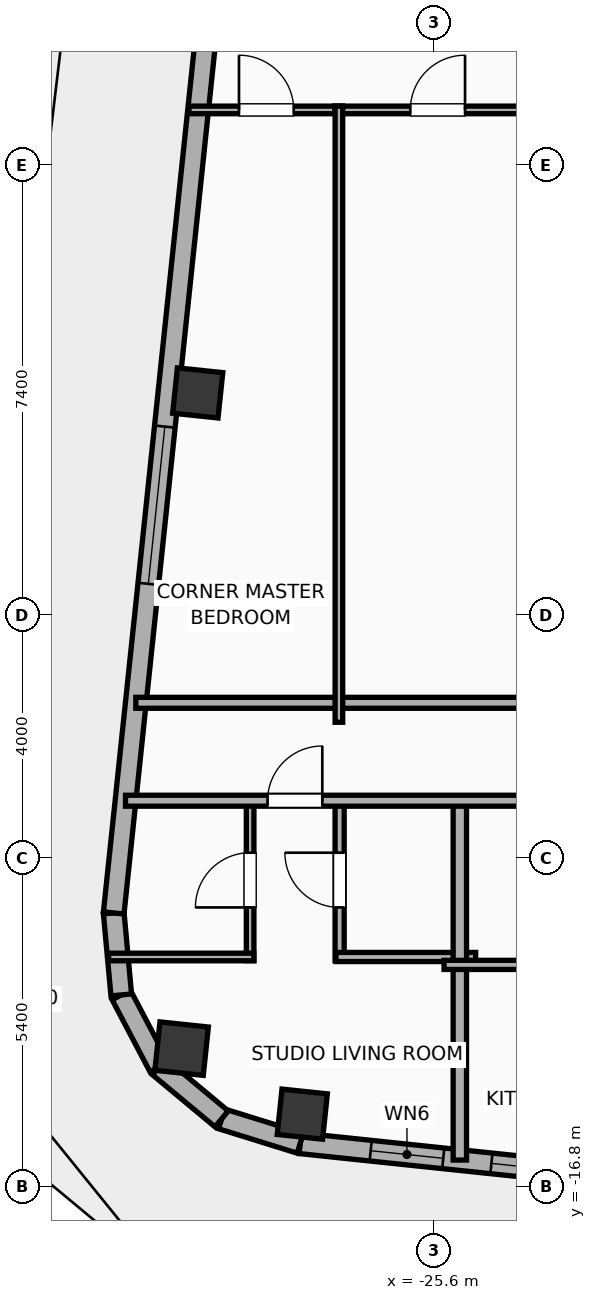
"""IFC4 building model, lengths in metres.
Left out: names, types, materials, properties, quantities, classifications, styles, units other than length and angle.
Written with IfcOpenShell. Run it as: python <this file> out.ifc"""

import sys

from ifc_helpers import new_model, si_unit, direction, frame, frame_2d, origin, origin_2d, place, context, subcontext, project, spatial, rectangle, hollow_rectangle, hollow_circle, extrude, element, fill, save


model = new_model("IFC4")
c1 = context("Model", 3, precision=1e-05, world=origin(), true_north=direction((0.0, 1.0)))
c2 = subcontext(c1, "Body", "Model", "MODEL_VIEW")
j1 = project(units=[si_unit("LENGTHUNIT", "METRE"), si_unit("PLANEANGLEUNIT", "RADIAN")], contexts=[c1])
p1 = place(None, origin())
s1 = spatial("IfcSite", under=j1, at=p1, CompositionType="ELEMENT")
p2 = place(p1, origin())
s2 = spatial("IfcBuilding", under=s1, at=p2, CompositionType="ELEMENT")
p3 = place(p2, frame((0.0, 0.0, 291.2)))
s3 = spatial("IfcBuildingStorey", under=s2, at=p3, CompositionType="ELEMENT", Elevation=291.2)
for number, where, z_axis, x_axis in (
    (1, (-27.769, -15.604, 0.0), (0.0, 0.0, 1.0), (0.995, -0.105, 0.0)),
    (2, (-29.489, -3.744, 0.0), (0.0, 0.0, 1.0), (0.995, -0.105, 0.0)),
):
    element("IfcColumn", number, at=place(p3, frame(where, z_axis=z_axis, x_axis=x_axis)), inside=s3, PredefinedType="COLUMN", context=c2, shape_type="SweptSolid", body=[
        extrude(hollow_rectangle(XDim=0.75, YDim=0.75, WallThickness=0.025, at=origin_2d()), origin(), (0.0, 0.0, 1.0), 3.9),
    ])
p4 = place(p3, frame((-29.753, -14.527, 0.0), z_axis=(0.0, 0.0, 1.0), x_axis=(0.994521895368, -0.104528463268, 0.0)))
e3 = element("IfcColumn", 3, at=p4, inside=s3, PredefinedType="COLUMN", context=c2, shape_type="SweptSolid", body=[
    extrude(hollow_circle(Radius=0.4, WallThickness=0.028, at=origin_2d()), origin(), (0.0, 0.0, 1.0), 3.9),
])
p5 = place(p3, frame((18.708, -20.972, 0.0), z_axis=(0.0, 0.0, 1.0), x_axis=(-0.994521888554, 0.104528528102, 0.0)))
e4 = element("IfcWall", 4, at=p5, inside=s3, PredefinedType="ELEMENTEDWALL", context=c2, shape_type="SweptSolid", body=[
    extrude(rectangle(XDim=46.766, YDim=0.34, at=frame_2d((23.383, 0.0))), origin(), (0.0, 0.0, 1.0), 3.635),
])
p6 = place(p5, frame((23.733, 0.0, 0.65)))
e5 = element("IfcOpeningElement", 5, at=p6, cuts=e4, PredefinedType="OPENING", context=c2, shape_type="SweptSolid", body=[
    extrude(rectangle(XDim=2.6, YDim=2.45, at=frame_2d((1.3, 1.225))), frame((0.0, 0.18, 0.0), z_axis=(0.0, -1.0, 0.0), x_axis=(1.0, 0.0, 0.0)), (0.0, 0.0, 1.0), 0.36),
])
p7 = place(p5, frame((44.402, 0.0, 0.75)))
e6 = element("IfcOpeningElement", 6, at=p7, cuts=e4, PredefinedType="OPENING", context=c2, shape_type="SweptSolid", body=[
    extrude(rectangle(XDim=1.2, YDim=2.05, at=frame_2d((0.6, 1.025))), frame((0.0, 0.18, 0.0), z_axis=(0.0, -1.0, 0.0), x_axis=(1.0, 0.0, 0.0)), (0.0, 0.0, 1.0), 0.36),
])
p8 = place(p5, frame((39.54, 0.0, 0.75)))
e7 = element("IfcOpeningElement", 7, at=p8, cuts=e4, PredefinedType="OPENING", context=c2, shape_type="SweptSolid", body=[
    extrude(rectangle(XDim=1.2, YDim=2.05, at=frame_2d((0.6, 1.025))), frame((0.0, 0.18, 0.0), z_axis=(0.0, -1.0, 0.0), x_axis=(1.0, 0.0, 0.0)), (0.0, 0.0, 1.0), 0.36),
])
p9 = place(p5, frame((42.406, 0.0, 0.75)))
e8 = element("IfcOpeningElement", 8, at=p9, cuts=e4, PredefinedType="OPENING", context=c2, shape_type="SweptSolid", body=[
    extrude(rectangle(XDim=1.2, YDim=2.05, at=frame_2d((0.6, 1.025))), frame((0.0, 0.18, 0.0), z_axis=(0.0, -1.0, 0.0), x_axis=(1.0, 0.0, 0.0)), (0.0, 0.0, 1.0), 0.36),
])
p10 = place(p5, frame((34.933, 0.0, 0.75)))
e9 = element("IfcOpeningElement", 9, at=p10, cuts=e4, PredefinedType="OPENING", context=c2, shape_type="SweptSolid", body=[
    extrude(rectangle(XDim=1.2, YDim=2.05, at=frame_2d((0.6, 1.025))), frame((0.0, 0.18, 0.0), z_axis=(0.0, -1.0, 0.0), x_axis=(1.0, 0.0, 0.0)), (0.0, 0.0, 1.0), 0.36),
])
p11 = place(p5, frame((28.631, 0.0, 0.75)))
e10 = element("IfcOpeningElement", 10, at=p11, cuts=e4, PredefinedType="OPENING", context=c2, shape_type="SweptSolid", body=[
    extrude(rectangle(XDim=1.2, YDim=2.05, at=frame_2d((0.6, 1.025))), frame((0.0, 0.18, 0.0), z_axis=(0.0, -1.0, 0.0), x_axis=(1.0, 0.0, 0.0)), (0.0, 0.0, 1.0), 0.36),
])
p12 = place(p5, frame((30.896, 0.0, 0.75)))
e11 = element("IfcOpeningElement", 11, at=p12, cuts=e4, PredefinedType="OPENING", context=c2, shape_type="SweptSolid", body=[
    extrude(rectangle(XDim=1.2, YDim=2.05, at=frame_2d((0.6, 1.025))), frame((0.0, 0.18, 0.0), z_axis=(0.0, -1.0, 0.0), x_axis=(1.0, 0.0, 0.0)), (0.0, 0.0, 1.0), 0.36),
])
p13 = place(p5, frame((7.501, 0.0, 0.75)))
e12 = element("IfcOpeningElement", 12, at=p13, cuts=e4, PredefinedType="OPENING", context=c2, shape_type="SweptSolid", body=[
    extrude(rectangle(XDim=1.2, YDim=2.05, at=frame_2d((0.6, 1.025))), frame((0.0, 0.18, 0.0), z_axis=(0.0, -1.0, 0.0), x_axis=(1.0, 0.0, 0.0)), (0.0, 0.0, 1.0), 0.36),
])
p14 = place(p5, frame((4.159, 0.0, 0.75)))
e13 = element("IfcOpeningElement", 13, at=p14, cuts=e4, PredefinedType="OPENING", context=c2, shape_type="SweptSolid", body=[
    extrude(rectangle(XDim=1.2, YDim=2.05, at=frame_2d((0.6, 1.025))), frame((0.0, 0.18, 0.0), z_axis=(0.0, -1.0, 0.0), x_axis=(1.0, 0.0, 0.0)), (0.0, 0.0, 1.0), 0.36),
])
p15 = place(p5, frame((1.369, 0.0, 0.75)))
e14 = element("IfcOpeningElement", 14, at=p15, cuts=e4, PredefinedType="OPENING", context=c2, shape_type="SweptSolid", body=[
    extrude(rectangle(XDim=1.2, YDim=2.05, at=frame_2d((0.6, 1.025))), frame((0.0, 0.18, 0.0), z_axis=(0.0, -1.0, 0.0), x_axis=(1.0, 0.0, 0.0)), (0.0, 0.0, 1.0), 0.36),
])
p16 = place(p5, frame((20.254, 0.0, 0.75)))
e15 = element("IfcOpeningElement", 15, at=p16, cuts=e4, PredefinedType="OPENING", context=c2, shape_type="SweptSolid", body=[
    extrude(rectangle(XDim=1.2, YDim=2.05, at=frame_2d((0.6, 1.025))), frame((0.0, 0.18, 0.0), z_axis=(0.0, -1.0, 0.0), x_axis=(1.0, 0.0, 0.0)), (0.0, 0.0, 1.0), 0.36),
])
p17 = place(p5, frame((16.172, 0.0, 0.75)))
e16 = element("IfcOpeningElement", 16, at=p17, cuts=e4, PredefinedType="OPENING", context=c2, shape_type="SweptSolid", body=[
    extrude(rectangle(XDim=1.2, YDim=2.05, at=frame_2d((0.6, 1.025))), frame((0.0, 0.18, 0.0), z_axis=(0.0, -1.0, 0.0), x_axis=(1.0, 0.0, 0.0)), (0.0, 0.0, 1.0), 0.36),
])
p18 = place(p5, frame((12.11, 0.0, 0.75)))
e17 = element("IfcOpeningElement", 17, at=p18, cuts=e4, PredefinedType="OPENING", context=c2, shape_type="SweptSolid", body=[
    extrude(rectangle(XDim=1.2, YDim=2.05, at=frame_2d((0.6, 1.025))), frame((0.0, 0.18, 0.0), z_axis=(0.0, -1.0, 0.0), x_axis=(1.0, 0.0, 0.0)), (0.0, 0.0, 1.0), 0.36),
])
p19 = place(p3, frame((-27.802, -16.084, 0.0), z_axis=(0.0, 0.0, 1.0), x_axis=(-0.955007802701, 0.296580674994, 0.0)))
e18 = element("IfcWall", 18, at=p19, inside=s3, PredefinedType="ELEMENTEDWALL", context=c2, shape_type="SweptSolid", body=[
    extrude(rectangle(XDim=1.354, YDim=0.34, at=frame_2d((0.677, 0.0))), origin(), (0.0, 0.0, 1.0), 3.635),
])
p20 = place(p3, frame((-29.096, -15.682, 0.0), z_axis=(0.0, 0.0, 1.0), x_axis=(-0.768864427906, 0.639411832469, 0.0)))
e19 = element("IfcWall", 19, at=p20, inside=s3, PredefinedType="ELEMENTEDWALL", context=c2, shape_type="SweptSolid", body=[
    extrude(rectangle(XDim=1.337, YDim=0.34, at=frame_2d((0.668, 0.0))), origin(), (0.0, 0.0, 1.0), 3.635),
])
p21 = place(p3, frame((-30.124, -14.827, 0.0), z_axis=(0.0, 0.0, 1.0), x_axis=(-0.465528132217, 0.885033083062, 0.0)))
e20 = element("IfcWall", 20, at=p21, inside=s3, PredefinedType="ELEMENTEDWALL", context=c2, shape_type="SweptSolid", body=[
    extrude(rectangle(XDim=1.337, YDim=0.34, at=frame_2d((0.668, 0.0))), origin(), (0.0, 0.0, 1.0), 3.635),
])
p22 = place(p3, frame((-30.746, -13.644, 0.0), z_axis=(0.0, 0.0, 1.0), x_axis=(-0.091592370975, 0.995796584438, 0.0)))
e21 = element("IfcWall", 21, at=p22, inside=s3, PredefinedType="ELEMENTEDWALL", context=c2, shape_type="SweptSolid", body=[
    extrude(rectangle(XDim=1.354, YDim=0.34, at=frame_2d((0.677, 0.0))), origin(), (0.0, 0.0, 1.0), 3.635),
])
p23 = place(p3, frame((-30.87, -12.296, 0.0), z_axis=(0.0, 0.0, 1.0), x_axis=(0.104533282919, 0.994521388791, 0.0)))
e22 = element("IfcWall", 22, at=p23, inside=s3, PredefinedType="ELEMENTEDWALL", context=c2, shape_type="SweptSolid", body=[
    extrude(rectangle(XDim=30.366, YDim=0.34, at=frame_2d((15.183, 0.0))), origin(), (0.0, 0.0, 1.0), 3.635),
])
p24 = place(p23, frame((14.433, 0.0, 0.0)))
e23 = element("IfcOpeningElement", 23, at=p24, cuts=e22, PredefinedType="OPENING", context=c2, shape_type="SweptSolid", body=[
    extrude(rectangle(XDim=1.5, YDim=2.05, at=frame_2d((0.75, 1.025))), frame((0.0, 0.18, 0.0), z_axis=(0.0, -1.0, 0.0), x_axis=(1.0, 0.0, 0.0)), (0.0, 0.0, 1.0), 0.36),
])
p25 = place(p23, frame((5.442, 0.0, 0.65)))
e24 = element("IfcOpeningElement", 24, at=p25, cuts=e22, PredefinedType="OPENING", context=c2, shape_type="SweptSolid", body=[
    extrude(rectangle(XDim=2.6, YDim=2.45, at=frame_2d((1.3, 1.225))), frame((0.0, 0.18, 0.0), z_axis=(0.0, -1.0, 0.0), x_axis=(1.0, 0.0, 0.0)), (0.0, 0.0, 1.0), 0.36),
])
p26 = place(p23, frame((26.861, 0.0, 0.75)))
e25 = element("IfcOpeningElement", 25, at=p26, cuts=e22, PredefinedType="OPENING", context=c2, shape_type="SweptSolid", body=[
    extrude(rectangle(XDim=1.2, YDim=2.05, at=frame_2d((0.6, 1.025))), frame((0.0, 0.18, 0.0), z_axis=(0.0, -1.0, 0.0), x_axis=(1.0, 0.0, 0.0)), (0.0, 0.0, 1.0), 0.36),
])
p27 = place(p3, frame((-30.507, -8.84, 0.0), z_axis=(0.0, 0.0, 1.0), x_axis=(1.0, 0.0, 0.0)))
e26 = element("IfcWall", 26, at=p27, inside=s3, PredefinedType="PARTITIONING", context=c2, shape_type="SweptSolid", body=[
    extrude(rectangle(XDim=20.627, YDim=0.18, at=frame_2d((10.313, 0.0))), origin(), (0.0, 0.0, 1.0), 3.635),
])
p28 = place(p3, frame((-28.627, -13.08, 0.0), z_axis=(0.0, 0.0, 1.0), x_axis=(0.0, 1.0, 0.0)))
e27 = element("IfcWall", 27, at=p28, inside=s3, PredefinedType="PARTITIONING", context=c2, shape_type="SweptSolid", body=[
    extrude(rectangle(XDim=2.65, YDim=0.125, at=frame_2d((1.325, 0.0))), origin(), (0.0, 0.0, 1.0), 3.635),
])
p29 = place(p28, frame((0.875, 0.0, 0.0)))
e28 = element("IfcOpeningElement", 28, at=p29, cuts=e27, PredefinedType="OPENING", context=c2, shape_type="SweptSolid", body=[
    extrude(rectangle(XDim=0.9, YDim=2.05, at=frame_2d((0.45, 1.025))), frame((0.0, 0.073, 0.0), z_axis=(0.0, -1.0, 0.0), x_axis=(1.0, 0.0, 0.0)), (0.0, 0.0, 1.0), 0.145),
])
p30 = place(p3, frame((-27.155, -13.08, 0.0), z_axis=(0.0, 0.0, 1.0), x_axis=(0.0, 1.0, 0.0)))
e29 = element("IfcWall", 29, at=p30, inside=s3, PredefinedType="PLUMBINGWALL", context=c2, shape_type="SweptSolid", body=[
    extrude(rectangle(XDim=2.65, YDim=0.15, at=frame_2d((1.325, 0.0))), origin(), (0.0, 0.0, 1.0), 3.635),
])
p31 = place(p30, frame((0.875, 0.0, 0.0)))
e30 = element("IfcOpeningElement", 30, at=p31, cuts=e29, PredefinedType="OPENING", context=c2, shape_type="SweptSolid", body=[
    extrude(rectangle(XDim=0.9, YDim=2.05, at=frame_2d((0.45, 1.025))), frame((0.0, 0.085, 0.0), z_axis=(0.0, -1.0, 0.0), x_axis=(1.0, 0.0, 0.0)), (0.0, 0.0, 1.0), 0.17),
])
p32 = place(p3, frame((-30.954, -13.02, 0.0), z_axis=(0.0, 0.0, 1.0), x_axis=(1.0, 0.0, 0.0)))
e31 = element("IfcWall", 31, at=p32, inside=s3, PredefinedType="PARTITIONING", context=c2, shape_type="SweptSolid", body=[
    extrude(rectangle(XDim=2.387, YDim=0.125, at=frame_2d((1.194, 0.0))), origin(), (0.0, 0.0, 1.0), 3.635),
])
p33 = place(p3, frame((-27.215, -13.02, 0.0), z_axis=(0.0, 0.0, 1.0), x_axis=(1.0, 0.0, 0.0)))
e32 = element("IfcWall", 32, at=p33, inside=s3, PredefinedType="PLUMBINGWALL", context=c2, shape_type="SweptSolid", body=[
    extrude(rectangle(XDim=2.297, YDim=0.15, at=frame_2d((1.148, 0.0))), origin(), (0.0, 0.0, 1.0), 3.635),
])
p34 = place(p3, frame((-25.178, -16.36, 0.0), z_axis=(0.0, 0.0, 1.0), x_axis=(0.0, 1.0, 0.0)))
e33 = element("IfcWall", 33, at=p34, inside=s3, PredefinedType="PARTITIONING", context=c2, shape_type="SweptSolid", body=[
    extrude(rectangle(XDim=5.99, YDim=0.22, at=frame_2d((2.995, 0.0))), origin(), (0.0, 0.0, 1.0), 3.635),
])
p35 = place(p3, frame((-25.438, -13.15, 0.0), z_axis=(0.0, 0.0, 1.0), x_axis=(1.0, 0.0, 0.0)))
e34 = element("IfcWall", 34, at=p35, inside=s3, PredefinedType="PLUMBINGWALL", context=c2, shape_type="SweptSolid", body=[
    extrude(rectangle(XDim=2.576, YDim=0.15, at=frame_2d((1.288, 0.0))), origin(), (0.0, 0.0, 1.0), 3.635),
])
p36 = place(p3, frame((-30.676, -10.45, 0.0), z_axis=(0.0, 0.0, 1.0), x_axis=(1.0, 0.0, 0.0)))
e35 = element("IfcWall", 35, at=p36, inside=s3, PredefinedType="PARTITIONING", context=c2, shape_type="SweptSolid", body=[
    extrude(rectangle(XDim=22.596, YDim=0.18, at=frame_2d((11.298, 0.0))), origin(), (0.0, 0.0, 1.0), 3.635),
])
p37 = place(p36, frame((2.336, 0.0, 0.0)))
e36 = element("IfcOpeningElement", 36, at=p37, cuts=e35, PredefinedType="OPENING", context=c2, shape_type="SweptSolid", body=[
    extrude(rectangle(XDim=0.9, YDim=2.05, at=frame_2d((0.45, 1.025))), frame((0.0, 0.1, 0.0), z_axis=(0.0, -1.0, 0.0), x_axis=(1.0, 0.0, 0.0)), (0.0, 0.0, 1.0), 0.2),
])
p38 = place(p36, frame((8.861, 0.0, 0.0)))
e37 = element("IfcOpeningElement", 37, at=p38, cuts=e35, PredefinedType="OPENING", context=c2, shape_type="SweptSolid", body=[
    extrude(rectangle(XDim=1.15, YDim=2.05, at=frame_2d((0.575, 1.025))), frame((0.0, 0.1, 0.0), z_axis=(0.0, -1.0, 0.0), x_axis=(1.0, 0.0, 0.0)), (0.0, 0.0, 1.0), 0.2),
])
p39 = place(p36, frame((13.774, 0.0, 0.0)))
e38 = element("IfcOpeningElement", 38, at=p39, cuts=e35, PredefinedType="OPENING", context=c2, shape_type="SweptSolid", body=[
    extrude(rectangle(XDim=0.9, YDim=2.05, at=frame_2d((0.45, 1.025))), frame((0.0, 0.1, 0.0), z_axis=(0.0, -1.0, 0.0), x_axis=(1.0, 0.0, 0.0)), (0.0, 0.0, 1.0), 0.2),
])
p40 = place(p36, frame((20.306, 0.0, 0.0)))
e39 = element("IfcOpeningElement", 39, at=p40, cuts=e35, PredefinedType="OPENING", context=c2, shape_type="SweptSolid", body=[
    extrude(rectangle(XDim=1.15, YDim=2.05, at=frame_2d((0.575, 1.025))), frame((0.0, 0.1, 0.0), z_axis=(0.0, -1.0, 0.0), x_axis=(1.0, 0.0, 0.0)), (0.0, 0.0, 1.0), 0.2),
])
p41 = place(p3, frame((-29.633, 0.91, 0.0), z_axis=(0.0, 0.0, 1.0), x_axis=(1.0, 0.0, 0.0)))
e40 = element("IfcWall", 40, at=p41, inside=s3, PredefinedType="PARTITIONING", context=c2, shape_type="SweptSolid", body=[
    extrude(rectangle(XDim=2.529, YDim=0.125, at=frame_2d((1.264, 0.0))), origin(), (0.0, 0.0, 1.0), 3.635),
])
p42 = place(p41, frame((0.823, 0.0, 0.0)))
e41 = element("IfcOpeningElement", 41, at=p42, cuts=e40, PredefinedType="OPENING", context=c2, shape_type="SweptSolid", body=[
    extrude(rectangle(XDim=0.9, YDim=2.05, at=frame_2d((0.45, 1.025))), frame((0.0, 0.073, 0.0), z_axis=(0.0, -1.0, 0.0), x_axis=(1.0, 0.0, 0.0)), (0.0, 0.0, 1.0), 0.145),
])
p43 = place(p3, frame((-27.229, 0.91, 0.0), z_axis=(0.0, 0.0, 1.0), x_axis=(1.0, 0.0, 0.0)))
e42 = element("IfcWall", 42, at=p43, inside=s3, PredefinedType="PARTITIONING", context=c2, shape_type="SweptSolid", body=[
    extrude(rectangle(XDim=3.374, YDim=0.125, at=frame_2d((1.687, 0.0))), origin(), (0.0, 0.0, 1.0), 3.635),
])
p44 = place(p43, frame((1.237, 0.0, 0.0)))
e43 = element("IfcOpeningElement", 43, at=p44, cuts=e42, PredefinedType="OPENING", context=c2, shape_type="SweptSolid", body=[
    extrude(rectangle(XDim=0.9, YDim=2.05, at=frame_2d((0.45, 1.025))), frame((0.0, 0.073, 0.0), z_axis=(0.0, -1.0, 0.0), x_axis=(1.0, 0.0, 0.0)), (0.0, 0.0, 1.0), 0.145),
])
p45 = place(p3, frame((-27.167, -9.16, 0.0), z_axis=(0.0, 0.0, 1.0), x_axis=(0.0, 1.0, 0.0)))
e44 = element("IfcWall", 44, at=p45, inside=s3, PredefinedType="PARTITIONING", context=c2, shape_type="SweptSolid", body=[
    extrude(rectangle(XDim=10.13, YDim=0.125, at=frame_2d((5.065, 0.0))), origin(), (0.0, 0.0, 1.0), 3.635),
])
p46 = place(p25, origin())
e45 = element("IfcWindow", 45, at=p46, inside=s3, PartitioningType="SINGLE_PANEL", PredefinedType="WINDOW", context=c2, shape_type="SweptSolid", body=[
    extrude(rectangle(XDim=2.6, YDim=2.45, at=frame_2d((1.3, 1.225))), frame((0.0, 0.03, 0.0), z_axis=(0.0, -1.0, 0.0), x_axis=(1.0, 0.0, 0.0)), (0.0, 0.0, 1.0), 0.06),
])
fill(e24, e45)
p47 = place(p7, origin())
e46 = element("IfcWindow", 46, at=p47, inside=s3, PartitioningType="SINGLE_PANEL", PredefinedType="WINDOW", context=c2, shape_type="SweptSolid", body=[
    extrude(rectangle(XDim=1.2, YDim=2.05, at=frame_2d((0.6, 1.025))), frame((0.0, 0.03, 0.0), z_axis=(0.0, -1.0, 0.0), x_axis=(1.0, 0.0, 0.0)), (0.0, 0.0, 1.0), 0.06),
])
fill(e6, e46)
p48 = place(p9, origin())
e47 = element("IfcWindow", 47, at=p48, inside=s3, PartitioningType="SINGLE_PANEL", PredefinedType="WINDOW", context=c2, shape_type="SweptSolid", body=[
    extrude(rectangle(XDim=1.2, YDim=2.05, at=frame_2d((0.6, 1.025))), frame((0.0, 0.03, 0.0), z_axis=(0.0, -1.0, 0.0), x_axis=(1.0, 0.0, 0.0)), (0.0, 0.0, 1.0), 0.06),
])
fill(e8, e47)
p49 = place(p29, origin())
e48 = element("IfcDoor", 48, at=p49, inside=s3, OperationType="SINGLE_SWING_LEFT", PredefinedType="DOOR", context=c2, shape_type="SweptSolid", body=[
    extrude(rectangle(XDim=0.9, YDim=2.05, at=frame_2d((0.45, 1.025))), frame((0.0, 0.025, 0.0), z_axis=(0.0, -1.0, 0.0), x_axis=(1.0, 0.0, 0.0)), (0.0, 0.0, 1.0), 0.05),
])
fill(e28, e48)
p50 = place(p31, origin())
e49 = element("IfcDoor", 49, at=p50, inside=s3, OperationType="SINGLE_SWING_RIGHT", PredefinedType="DOOR", context=c2, shape_type="SweptSolid", body=[
    extrude(rectangle(XDim=0.9, YDim=2.05, at=frame_2d((0.45, 1.025))), frame((0.0, 0.025, 0.0), z_axis=(0.0, -1.0, 0.0), x_axis=(1.0, 0.0, 0.0)), (0.0, 0.0, 1.0), 0.05),
])
fill(e30, e49)
p51 = place(p37, origin())
e50 = element("IfcDoor", 50, at=p51, inside=s3, OperationType="SINGLE_SWING_RIGHT", PredefinedType="DOOR", context=c2, shape_type="SweptSolid", body=[
    extrude(rectangle(XDim=0.9, YDim=2.05, at=frame_2d((0.45, 1.025))), frame((0.0, 0.025, 0.0), z_axis=(0.0, -1.0, 0.0), x_axis=(1.0, 0.0, 0.0)), (0.0, 0.0, 1.0), 0.05),
])
fill(e36, e50)
p52 = place(p42, origin())
e51 = element("IfcDoor", 51, at=p52, inside=s3, OperationType="SINGLE_SWING_LEFT", PredefinedType="DOOR", context=c2, shape_type="SweptSolid", body=[
    extrude(rectangle(XDim=0.9, YDim=2.05, at=frame_2d((0.45, 1.025))), frame((0.0, 0.025, 0.0), z_axis=(0.0, -1.0, 0.0), x_axis=(1.0, 0.0, 0.0)), (0.0, 0.0, 1.0), 0.05),
])
fill(e41, e51)
p53 = place(p44, origin())
e52 = element("IfcDoor", 52, at=p53, inside=s3, OperationType="SINGLE_SWING_RIGHT", PredefinedType="DOOR", context=c2, shape_type="SweptSolid", body=[
    extrude(rectangle(XDim=0.9, YDim=2.05, at=frame_2d((0.45, 1.025))), frame((0.0, 0.025, 0.0), z_axis=(0.0, -1.0, 0.0), x_axis=(1.0, 0.0, 0.0)), (0.0, 0.0, 1.0), 0.05),
])
fill(e43, e52)
save(model, sys.argv[1])
